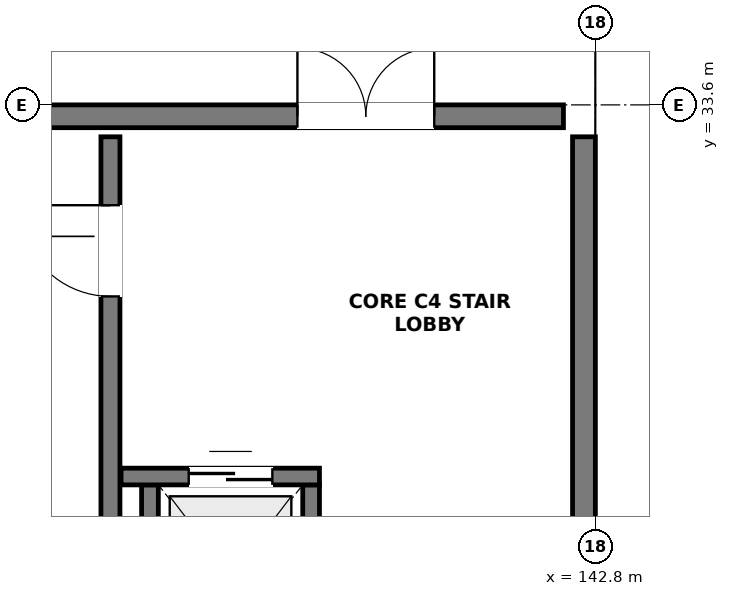
"""IFC4 building model, lengths in metres.
Left out: names, types, materials, properties, quantities, classifications, styles, units other than length and angle.
Written with IfcOpenShell. Run it as: python <this file> out.ifc"""

import sys

from ifc_helpers import new_model, si_unit, direction, frame, frame_2d, origin, place, context, subcontext, project, spatial, rectangle, extrude, element, fill, save


model = new_model("IFC4")
c1 = context("Model", 3, precision=1e-05, world=origin(), true_north=direction((0.0, 1.0)))
c2 = subcontext(c1, "Body", "Model", "MODEL_VIEW")
j1 = project(units=[si_unit("LENGTHUNIT", "METRE"), si_unit("PLANEANGLEUNIT", "RADIAN")], contexts=[c1])
p1 = place(None, origin())
s1 = spatial("IfcSite", under=j1, at=p1, CompositionType="ELEMENT")
p2 = place(p1, origin())
s2 = spatial("IfcBuilding", under=s1, at=p2, CompositionType="ELEMENT")
p3 = place(p2, frame((0.0, 0.0, 5.1)))
s3 = spatial("IfcBuildingStorey", under=s2, at=p3, CompositionType="ELEMENT", Elevation=5.1)
p4 = place(p3, frame((126.45, 33.45, 0.0), z_axis=(0.0, 0.0, 1.0), x_axis=(1.0, 0.0, 0.0)))
e1 = element("IfcWall", 1, at=p4, inside=s3, PredefinedType="SHEAR", context=c2, shape_type="SweptSolid", body=[
    extrude(rectangle(XDim=15.93, YDim=0.3, at=frame_2d((7.965, 0.0))), origin(), (0.0, 0.0, 1.0), 4.5),
])
p5 = place(p4, frame((12.43, 0.0, 0.0)))
e2 = element("IfcOpeningElement", 2, at=p5, cuts=e1, PredefinedType="OPENING", context=c2, shape_type="SweptSolid", body=[
    extrude(rectangle(XDim=1.8, YDim=2.2, at=frame_2d((0.9, 1.1))), frame((0.0, 0.162, 0.0), z_axis=(0.0, -1.0, 0.0), x_axis=(1.0, 0.0, 0.0)), (0.0, 0.0, 1.0), 0.324),
])
p6 = place(p3, frame((142.65, 25.62, 0.0), z_axis=(0.0, 0.0, 1.0), x_axis=(0.0, 1.0, 0.0)))
e3 = element("IfcWall", 3, at=p6, inside=s3, PredefinedType="SHEAR", context=c2, shape_type="SweptSolid", body=[
    extrude(rectangle(XDim=7.56, YDim=0.3, at=frame_2d((3.78, 0.0))), origin(), (0.0, 0.0, 1.0), 4.5),
])
p7 = place(p3, frame((136.42, 25.62, 0.0), z_axis=(0.0, 0.0, 1.0), x_axis=(0.0, 1.0, 0.0)))
e4 = element("IfcWall", 4, at=p7, inside=s3, PredefinedType="SHEAR", context=c2, shape_type="SweptSolid", body=[
    extrude(rectangle(XDim=7.56, YDim=0.25, at=frame_2d((3.78, 0.0))), origin(), (0.0, 0.0, 1.0), 4.5),
])
p8 = place(p7, frame((5.46, 0.0, 0.0)))
e5 = element("IfcOpeningElement", 5, at=p8, cuts=e4, PredefinedType="OPENING", context=c2, shape_type="SweptSolid", body=[
    extrude(rectangle(XDim=1.2, YDim=2.2, at=frame_2d((0.6, 1.1))), frame((0.0, 0.137, 0.0), z_axis=(0.0, -1.0, 0.0), x_axis=(1.0, 0.0, 0.0)), (0.0, 0.0, 1.0), 0.274),
])
for number, where, z_axis, x_axis in (
    (6, (136.94, 26.2, 0.0), (0.0, 0.0, 1.0), (0.0, 1.0, 0.0)),
    (7, (139.06, 26.2, 0.0), (0.0, 0.0, 1.0), (0.0, 1.0, 0.0)),
):
    element("IfcWall", number, at=place(p3, frame(where, z_axis=z_axis, x_axis=x_axis)), inside=s3, PredefinedType="SOLIDWALL", context=c2, shape_type="SweptSolid", body=[
        extrude(rectangle(XDim=2.4, YDim=0.22, at=frame_2d((1.2, 0.0))), origin(), (0.0, 0.0, 1.0), 4.5),
    ])
p9 = place(p3, frame((136.56, 28.71, 0.0), z_axis=(0.0, 0.0, 1.0), x_axis=(1.0, 0.0, 0.0)))
e8 = element("IfcWall", 8, at=p9, inside=s3, PredefinedType="SOLIDWALL", context=c2, shape_type="SweptSolid", body=[
    extrude(rectangle(XDim=2.61, YDim=0.22, at=frame_2d((1.305, 0.0))), origin(), (0.0, 0.0, 1.0), 4.5),
])
p10 = place(p9, frame((0.89, 0.0, 0.0)))
e9 = element("IfcOpeningElement", 9, at=p10, cuts=e8, PredefinedType="OPENING", context=c2, shape_type="SweptSolid", body=[
    extrude(rectangle(XDim=1.1, YDim=2.15, at=frame_2d((0.55, 1.075))), frame((0.0, 0.122, 0.0), z_axis=(0.0, -1.0, 0.0), x_axis=(1.0, 0.0, 0.0)), (0.0, 0.0, 1.0), 0.244),
])
p11 = place(p5, origin())
e10 = element("IfcDoor", 10, at=p11, inside=s3, OperationType="DOUBLE_DOOR_SINGLE_SWING", PredefinedType="DOOR", context=c2, shape_type="SweptSolid", body=[
    extrude(rectangle(XDim=1.8, YDim=2.2, at=frame_2d((0.9, 1.1))), frame((0.0, 0.025, 0.0), z_axis=(0.0, -1.0, 0.0), x_axis=(1.0, 0.0, 0.0)), (0.0, 0.0, 1.0), 0.05),
])
fill(e2, e10)
p12 = place(p8, origin())
e11 = element("IfcDoor", 11, at=p12, inside=s3, OperationType="SINGLE_SWING_RIGHT", PredefinedType="DOOR", context=c2, shape_type="SweptSolid", body=[
    extrude(rectangle(XDim=1.2, YDim=2.2, at=frame_2d((0.6, 1.1))), frame((0.0, 0.025, 0.0), z_axis=(0.0, -1.0, 0.0), x_axis=(1.0, 0.0, 0.0)), (0.0, 0.0, 1.0), 0.05),
])
fill(e5, e11)
p13 = place(p10, origin())
e12 = element("IfcDoor", 12, at=p13, inside=s3, OperationType="DOUBLE_DOOR_SLIDING", PredefinedType="DOOR", context=c2, shape_type="SweptSolid", body=[
    extrude(rectangle(XDim=1.1, YDim=2.15, at=frame_2d((0.55, 1.075))), frame((0.0, 0.025, 0.0), z_axis=(0.0, -1.0, 0.0), x_axis=(1.0, 0.0, 0.0)), (0.0, 0.0, 1.0), 0.05),
])
fill(e9, e12)
save(model, sys.argv[1])
